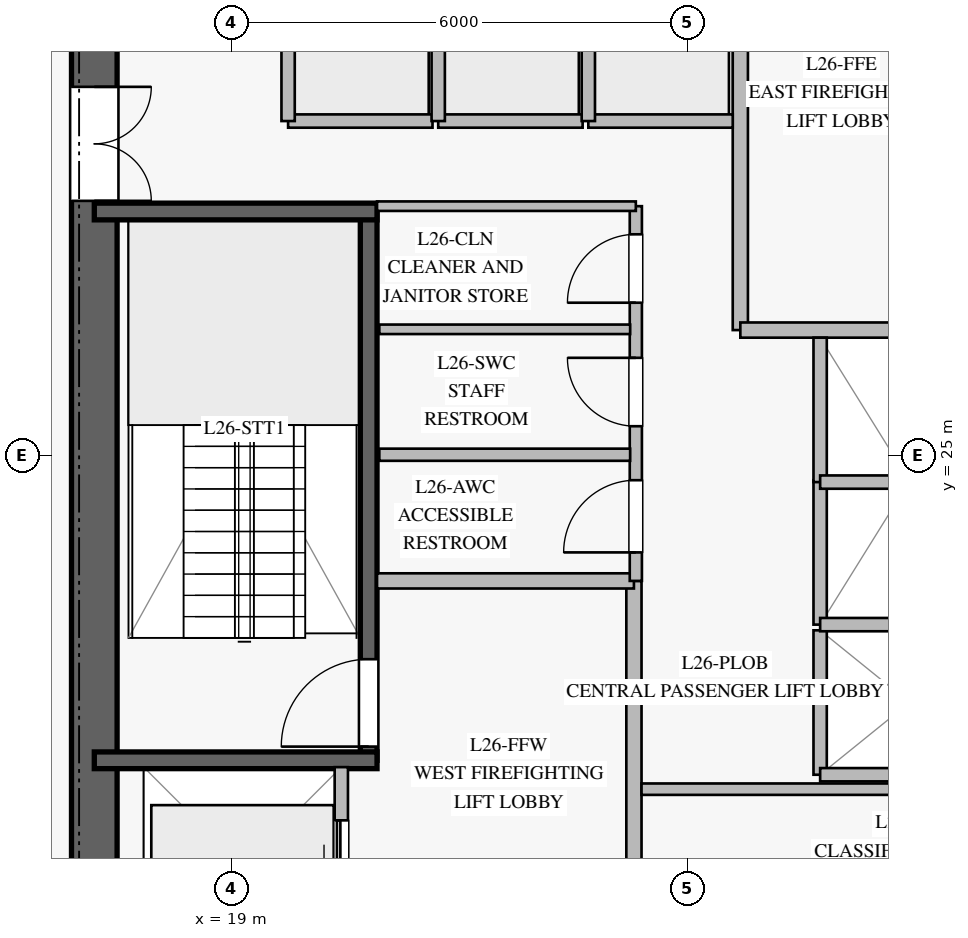
"""IFC4 building model, lengths in metres.
Left out: names, types, materials, properties, quantities, classifications, styles, units other than length and angle.
Written with IfcOpenShell. Run it as: python <this file> out.ifc"""

import sys

from ifc_helpers import new_model, si_unit, direction, frame, frame_2d, origin, place, context, subcontext, project, spatial, rectangle, extrude, element, fill, save


model = new_model("IFC4")
c1 = context("Model", 3, precision=1e-05, world=origin(), true_north=direction((0.0, 1.0)))
c2 = subcontext(c1, "Body", "Model", "MODEL_VIEW")
j1 = project(units=[si_unit("LENGTHUNIT", "METRE"), si_unit("PLANEANGLEUNIT", "RADIAN")], contexts=[c1])
p1 = place(None, origin())
s1 = spatial("IfcSite", under=j1, at=p1, CompositionType="ELEMENT")
p2 = place(p1, origin())
s2 = spatial("IfcBuilding", under=s1, at=p2, CompositionType="ELEMENT")
p3 = place(p2, frame((0.0, 0.0, 110.4)))
s3 = spatial("IfcBuildingStorey", under=s2, at=p3, CompositionType="ELEMENT", Elevation=110.4)
p4 = place(p3, frame((17.2, 31.9, 0.0), z_axis=(0.0, 0.0, 1.0), x_axis=(0.0, -1.0, 0.0)))
e1 = element("IfcWall", 1, at=p4, inside=s3, PredefinedType="SHEAR", context=c2, shape_type="SweptSolid", body=[
    extrude(rectangle(XDim=13.8, YDim=0.6, at=frame_2d((6.9, 0.0))), origin(), (0.0, 0.0, 1.0), 3.76),
])
p5 = place(p4, frame((2.05, 0.0, 0.0)))
e2 = element("IfcOpeningElement", 2, at=p5, cuts=e1, PredefinedType="OPENING", context=c2, shape_type="SweptSolid", body=[
    extrude(rectangle(XDim=1.5, YDim=2.2, at=frame_2d((0.75, 1.1))), frame((0.0, 0.31, 0.0), z_axis=(0.0, -1.0, 0.0), x_axis=(1.0, 0.0, 0.0)), (0.0, 0.0, 1.0), 0.62),
])
p6 = place(p3, frame((20.81, 20.99, 0.0), z_axis=(0.0, 0.0, 1.0), x_axis=(0.0, 1.0, 0.0)))
e3 = element("IfcWall", 3, at=p6, inside=s3, PredefinedType="SOLIDWALL", context=c2, shape_type="SweptSolid", body=[
    extrude(rectangle(XDim=7.22, YDim=0.22, at=frame_2d((3.61, 0.0))), origin(), (0.0, 0.0, 1.0), 3.76),
])
p7 = place(p6, frame((0.18, 0.0, 0.0)))
e4 = element("IfcOpeningElement", 4, at=p7, cuts=e3, PredefinedType="OPENING", context=c2, shape_type="SweptSolid", body=[
    extrude(rectangle(XDim=1.15, YDim=2.2, at=frame_2d((0.575, 1.1))), frame((0.0, 0.12, 0.0), z_axis=(0.0, -1.0, 0.0), x_axis=(1.0, 0.0, 0.0)), (0.0, 0.0, 1.0), 0.24),
])
for number, where, z_axis, x_axis in (
    (5, (17.2, 20.99, 0.0), (0.0, 0.0, 1.0), (1.0, 0.0, 0.0)),
    (6, (17.2, 28.21, 0.0), (0.0, 0.0, 1.0), (1.0, 0.0, 0.0)),
):
    element("IfcWall", number, at=place(p3, frame(where, z_axis=z_axis, x_axis=x_axis)), inside=s3, PredefinedType="SOLIDWALL", context=c2, shape_type="SweptSolid", body=[
        extrude(rectangle(XDim=3.72, YDim=0.22, at=frame_2d((1.86, 0.0))), origin(), (0.0, 0.0, 1.0), 3.76),
    ])
p8 = place(p3, frame((24.3, 18.2, 0.0), z_axis=(0.0, 0.0, 1.0), x_axis=(0.0, 1.0, 0.0)))
e7 = element("IfcWall", 7, at=p8, inside=s3, PredefinedType="PARTITIONING", context=c2, shape_type="SweptSolid", body=[
    extrude(rectangle(XDim=5.15, YDim=0.2, at=frame_2d((2.575, 0.0))), origin(), (0.0, 0.0, 1.0), 3.76),
])
p9 = place(p3, frame((20.92, 23.35, 0.0), z_axis=(0.0, 0.0, 1.0), x_axis=(1.0, 0.0, 0.0)))
e8 = element("IfcWall", 8, at=p9, inside=s3, PredefinedType="PARTITIONING", context=c2, shape_type="SweptSolid", body=[
    extrude(rectangle(XDim=3.38, YDim=0.2, at=frame_2d((1.69, 0.0))), origin(), (0.0, 0.0, 1.0), 3.76),
])
p10 = place(p3, frame((25.7, 26.65, 0.0), z_axis=(0.0, 0.0, 1.0), x_axis=(0.0, 1.0, 0.0)))
e9 = element("IfcWall", 9, at=p10, inside=s3, PredefinedType="PARTITIONING", context=c2, shape_type="SweptSolid", body=[
    extrude(rectangle(XDim=5.15, YDim=0.2, at=frame_2d((2.575, 0.0))), origin(), (0.0, 0.0, 1.0), 3.76),
])
p11 = place(p3, frame((25.7, 26.65, 0.0), z_axis=(0.0, 0.0, 1.0), x_axis=(1.0, 0.0, 0.0)))
e10 = element("IfcWall", 10, at=p11, inside=s3, PredefinedType="PARTITIONING", context=c2, shape_type="SweptSolid", body=[
    extrude(rectangle(XDim=3.38, YDim=0.2, at=frame_2d((1.69, 0.0))), origin(), (0.0, 0.0, 1.0), 3.76),
])
p12 = place(p3, frame((24.325, 23.35, 0.0), z_axis=(0.0, 0.0, 1.0), x_axis=(0.0, 1.0, 0.0)))
e11 = element("IfcWall", 11, at=p12, inside=s3, PredefinedType="PLUMBINGWALL", context=c2, shape_type="SweptSolid", body=[
    extrude(rectangle(XDim=4.93, YDim=0.16, at=frame_2d((2.465, 0.0))), origin(), (0.0, 0.0, 1.0), 3.76),
])
p13 = place(p12, frame((0.375, 0.0, 0.0)))
e12 = element("IfcOpeningElement", 12, at=p13, cuts=e11, PredefinedType="OPENING", context=c2, shape_type="SweptSolid", body=[
    extrude(rectangle(XDim=0.95, YDim=2.1, at=frame_2d((0.475, 1.05))), frame((0.0, 0.09, 0.0), z_axis=(0.0, -1.0, 0.0), x_axis=(1.0, 0.0, 0.0)), (0.0, 0.0, 1.0), 0.18),
])
p14 = place(p12, frame((2.035, 0.0, 0.0)))
e13 = element("IfcOpeningElement", 13, at=p14, cuts=e11, PredefinedType="OPENING", context=c2, shape_type="SweptSolid", body=[
    extrude(rectangle(XDim=0.9, YDim=2.1, at=frame_2d((0.45, 1.05))), frame((0.0, 0.09, 0.0), z_axis=(0.0, -1.0, 0.0), x_axis=(1.0, 0.0, 0.0)), (0.0, 0.0, 1.0), 0.18),
])
p15 = place(p12, frame((3.66, 0.0, 0.0)))
e14 = element("IfcOpeningElement", 14, at=p15, cuts=e11, PredefinedType="OPENING", context=c2, shape_type="SweptSolid", body=[
    extrude(rectangle(XDim=0.9, YDim=2.1, at=frame_2d((0.45, 1.05))), frame((0.0, 0.09, 0.0), z_axis=(0.0, -1.0, 0.0), x_axis=(1.0, 0.0, 0.0)), (0.0, 0.0, 1.0), 0.18),
])
p16 = place(p3, frame((20.92, 28.28, 0.0), z_axis=(0.0, 0.0, 1.0), x_axis=(1.0, 0.0, 0.0)))
e15 = element("IfcWall", 15, at=p16, inside=s3, PredefinedType="PARTITIONING", context=c2, shape_type="SweptSolid", body=[
    extrude(rectangle(XDim=3.405, YDim=0.125, at=frame_2d((1.703, 0.0))), origin(), (0.0, 0.0, 1.0), 3.76),
])
p17 = place(p3, frame((20.95, 25.01, 0.0), z_axis=(0.0, 0.0, 1.0), x_axis=(1.0, 0.0, 0.0)))
e16 = element("IfcWall", 16, at=p17, inside=s3, PredefinedType="PLUMBINGWALL", context=c2, shape_type="SweptSolid", body=[
    extrude(rectangle(XDim=3.3, YDim=0.16, at=frame_2d((1.65, 0.0))), origin(), (0.0, 0.0, 1.0), 3.76),
])
p18 = place(p3, frame((20.95, 26.66, 0.0), z_axis=(0.0, 0.0, 1.0), x_axis=(1.0, 0.0, 0.0)))
e17 = element("IfcWall", 17, at=p18, inside=s3, PredefinedType="PARTITIONING", context=c2, shape_type="SweptSolid", body=[
    extrude(rectangle(XDim=3.3, YDim=0.125, at=frame_2d((1.65, 0.0))), origin(), (0.0, 0.0, 1.0), 3.76),
])
p19 = place(p3, frame((24.4, 20.61, 0.0), z_axis=(0.0, 0.0, 1.0), x_axis=(1.0, 0.0, 0.0)))
e18 = element("IfcWall", 18, at=p19, inside=s3, PredefinedType="PARTITIONING", context=c2, shape_type="SweptSolid", body=[
    extrude(rectangle(XDim=5.9, YDim=0.15, at=frame_2d((2.95, 0.0))), origin(), (0.0, 0.0, 1.0), 3.76),
])
p20 = place(p3, frame((19.75, 29.4, 0.0), z_axis=(0.0, 0.0, 1.0), x_axis=(1.0, 0.0, 0.0)))
e19 = element("IfcWall", 19, at=p20, inside=s3, PredefinedType="PARTITIONING", context=c2, shape_type="SweptSolid", body=[
    extrude(rectangle(XDim=1.9, YDim=0.175, at=frame_2d((0.95, 0.0))), origin(), (0.0, 0.0, 1.0), 3.76),
])
p21 = place(p3, frame((19.75, 29.4, 0.0), z_axis=(0.0, 0.0, 1.0), x_axis=(0.0, 1.0, 0.0)))
e20 = element("IfcWall", 20, at=p21, inside=s3, PredefinedType="PARTITIONING", context=c2, shape_type="SweptSolid", body=[
    extrude(rectangle(XDim=2.35, YDim=0.175, at=frame_2d((1.175, 0.0))), origin(), (0.0, 0.0, 1.0), 3.76),
])
p22 = place(p3, frame((21.725, 29.4, 0.0), z_axis=(0.0, 0.0, 1.0), x_axis=(1.0, 0.0, 0.0)))
e21 = element("IfcWall", 21, at=p22, inside=s3, PredefinedType="PARTITIONING", context=c2, shape_type="SweptSolid", body=[
    extrude(rectangle(XDim=1.9, YDim=0.175, at=frame_2d((0.95, 0.0))), origin(), (0.0, 0.0, 1.0), 3.76),
])
p23 = place(p3, frame((21.725, 29.4, 0.0), z_axis=(0.0, 0.0, 1.0), x_axis=(0.0, 1.0, 0.0)))
e22 = element("IfcWall", 22, at=p23, inside=s3, PredefinedType="PARTITIONING", context=c2, shape_type="SweptSolid", body=[
    extrude(rectangle(XDim=2.35, YDim=0.175, at=frame_2d((1.175, 0.0))), origin(), (0.0, 0.0, 1.0), 3.76),
])
p24 = place(p3, frame((23.7, 29.4, 0.0), z_axis=(0.0, 0.0, 1.0), x_axis=(1.0, 0.0, 0.0)))
e23 = element("IfcWall", 23, at=p24, inside=s3, PredefinedType="PARTITIONING", context=c2, shape_type="SweptSolid", body=[
    extrude(rectangle(XDim=1.9, YDim=0.175, at=frame_2d((0.95, 0.0))), origin(), (0.0, 0.0, 1.0), 3.76),
])
p25 = place(p3, frame((23.7, 29.4, 0.0), z_axis=(0.0, 0.0, 1.0), x_axis=(0.0, 1.0, 0.0)))
e24 = element("IfcWall", 24, at=p25, inside=s3, PredefinedType="PARTITIONING", context=c2, shape_type="SweptSolid", body=[
    extrude(rectangle(XDim=2.35, YDim=0.175, at=frame_2d((1.175, 0.0))), origin(), (0.0, 0.0, 1.0), 3.76),
])
p26 = place(p3, frame((26.75, 20.8, 0.0), z_axis=(0.0, 0.0, 1.0), x_axis=(0.0, 1.0, 0.0)))
e25 = element("IfcWall", 25, at=p26, inside=s3, PredefinedType="PARTITIONING", context=c2, shape_type="SweptSolid", body=[
    extrude(rectangle(XDim=1.9, YDim=0.175, at=frame_2d((0.95, 0.0))), origin(), (0.0, 0.0, 1.0), 3.76),
])
p27 = place(p3, frame((26.75, 20.8, 0.0), z_axis=(0.0, 0.0, 1.0), x_axis=(1.0, 0.0, 0.0)))
e26 = element("IfcWall", 26, at=p27, inside=s3, PredefinedType="PARTITIONING", context=c2, shape_type="SweptSolid", body=[
    extrude(rectangle(XDim=2.35, YDim=0.175, at=frame_2d((1.175, 0.0))), origin(), (0.0, 0.0, 1.0), 3.76),
])
p28 = place(p3, frame((26.75, 22.775, 0.0), z_axis=(0.0, 0.0, 1.0), x_axis=(0.0, 1.0, 0.0)))
e27 = element("IfcWall", 27, at=p28, inside=s3, PredefinedType="PARTITIONING", context=c2, shape_type="SweptSolid", body=[
    extrude(rectangle(XDim=1.9, YDim=0.175, at=frame_2d((0.95, 0.0))), origin(), (0.0, 0.0, 1.0), 3.76),
])
p29 = place(p3, frame((26.75, 22.775, 0.0), z_axis=(0.0, 0.0, 1.0), x_axis=(1.0, 0.0, 0.0)))
e28 = element("IfcWall", 28, at=p29, inside=s3, PredefinedType="PARTITIONING", context=c2, shape_type="SweptSolid", body=[
    extrude(rectangle(XDim=2.35, YDim=0.175, at=frame_2d((1.175, 0.0))), origin(), (0.0, 0.0, 1.0), 3.76),
])
p30 = place(p3, frame((26.75, 24.65, 0.0), z_axis=(0.0, 0.0, 1.0), x_axis=(0.0, 1.0, 0.0)))
e29 = element("IfcWall", 29, at=p30, inside=s3, PredefinedType="PARTITIONING", context=c2, shape_type="SweptSolid", body=[
    extrude(rectangle(XDim=1.9, YDim=0.175, at=frame_2d((0.95, 0.0))), origin(), (0.0, 0.0, 1.0), 3.76),
])
p31 = place(p3, frame((26.75, 24.65, 0.0), z_axis=(0.0, 0.0, 1.0), x_axis=(1.0, 0.0, 0.0)))
e30 = element("IfcWall", 30, at=p31, inside=s3, PredefinedType="PARTITIONING", context=c2, shape_type="SweptSolid", body=[
    extrude(rectangle(XDim=2.35, YDim=0.175, at=frame_2d((1.175, 0.0))), origin(), (0.0, 0.0, 1.0), 3.76),
])
p32 = place(p3, frame((20.45, 18.3, 0.0), z_axis=(0.0, 0.0, 1.0), x_axis=(0.0, 1.0, 0.0)))
e31 = element("IfcWall", 31, at=p32, inside=s3, PredefinedType="PARTITIONING", context=c2, shape_type="SweptSolid", body=[
    extrude(rectangle(XDim=2.6, YDim=0.175, at=frame_2d((1.3, 0.0))), origin(), (0.0, 0.0, 1.0), 3.76),
])
p33 = place(p32, frame((0.7, 0.0, 0.0)))
e32 = element("IfcOpeningElement", 32, at=p33, cuts=e31, PredefinedType="OPENING", context=c2, shape_type="SweptSolid", body=[
    extrude(rectangle(XDim=1.2, YDim=2.2, at=frame_2d((0.6, 1.1))), frame((0.0, 0.098, 0.0), z_axis=(0.0, -1.0, 0.0), x_axis=(1.0, 0.0, 0.0)), (0.0, 0.0, 1.0), 0.195),
])
p34 = place(p7, origin())
e33 = element("IfcDoor", 33, at=p34, inside=s3, OperationType="SINGLE_SWING_LEFT", PredefinedType="DOOR", context=c2, shape_type="SweptSolid", body=[
    extrude(rectangle(XDim=1.15, YDim=2.2, at=frame_2d((0.575, 1.1))), frame((0.0, 0.025, 0.0), z_axis=(0.0, -1.0, 0.0), x_axis=(1.0, 0.0, 0.0)), (0.0, 0.0, 1.0), 0.05),
])
fill(e4, e33)
p35 = place(p5, origin())
e34 = element("IfcDoor", 34, at=p35, inside=s3, OperationType="DOUBLE_DOOR_SINGLE_SWING", PredefinedType="DOOR", context=c2, shape_type="SweptSolid", body=[
    extrude(rectangle(XDim=1.5, YDim=2.2, at=frame_2d((0.75, 1.1))), frame((0.0, 0.025, 0.0), z_axis=(0.0, -1.0, 0.0), x_axis=(1.0, 0.0, 0.0)), (0.0, 0.0, 1.0), 0.05),
])
fill(e2, e34)
p36 = place(p13, origin())
e35 = element("IfcDoor", 35, at=p36, inside=s3, OperationType="SINGLE_SWING_LEFT", PredefinedType="DOOR", context=c2, shape_type="SweptSolid", body=[
    extrude(rectangle(XDim=0.95, YDim=2.1, at=frame_2d((0.475, 1.05))), frame((0.0, 0.025, 0.0), z_axis=(0.0, -1.0, 0.0), x_axis=(1.0, 0.0, 0.0)), (0.0, 0.0, 1.0), 0.05),
])
fill(e12, e35)
p37 = place(p14, origin())
e36 = element("IfcDoor", 36, at=p37, inside=s3, OperationType="SINGLE_SWING_RIGHT", PredefinedType="DOOR", context=c2, shape_type="SweptSolid", body=[
    extrude(rectangle(XDim=0.9, YDim=2.1, at=frame_2d((0.45, 1.05))), frame((0.0, 0.025, 0.0), z_axis=(0.0, -1.0, 0.0), x_axis=(1.0, 0.0, 0.0)), (0.0, 0.0, 1.0), 0.05),
])
fill(e13, e36)
p38 = place(p15, origin())
e37 = element("IfcDoor", 37, at=p38, inside=s3, OperationType="SINGLE_SWING_LEFT", PredefinedType="DOOR", context=c2, shape_type="SweptSolid", body=[
    extrude(rectangle(XDim=0.9, YDim=2.1, at=frame_2d((0.45, 1.05))), frame((0.0, 0.025, 0.0), z_axis=(0.0, -1.0, 0.0), x_axis=(1.0, 0.0, 0.0)), (0.0, 0.0, 1.0), 0.05),
])
fill(e14, e37)
p39 = place(p33, origin())
e38 = element("IfcDoor", 38, at=p39, inside=s3, OperationType="DOUBLE_DOOR_SLIDING", PredefinedType="DOOR", context=c2, shape_type="SweptSolid", body=[
    extrude(rectangle(XDim=1.2, YDim=2.2, at=frame_2d((0.6, 1.1))), frame((0.0, 0.025, 0.0), z_axis=(0.0, -1.0, 0.0), x_axis=(1.0, 0.0, 0.0)), (0.0, 0.0, 1.0), 0.05),
])
fill(e32, e38)
save(model, sys.argv[1])
